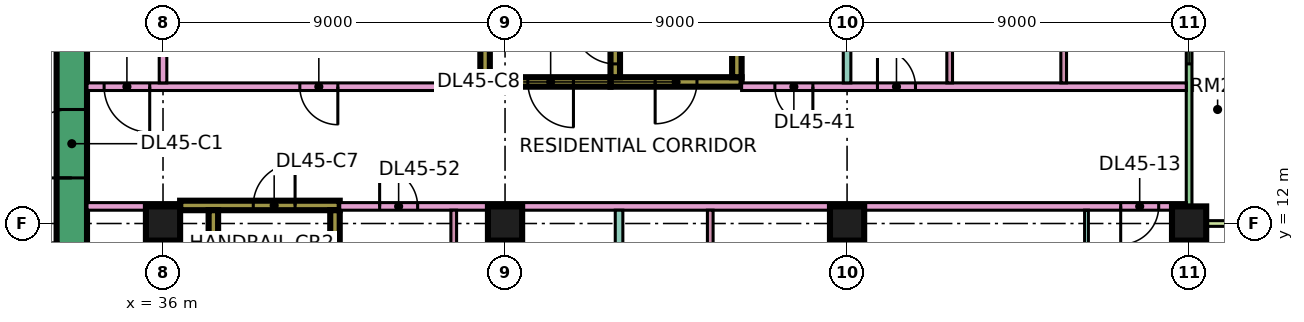
"""IFC4 building model, lengths in metres.
Left out: names, types, materials, properties, quantities, classifications, styles, units other than length and angle.
Written with IfcOpenShell. Run it as: python <this file> out.ifc"""

import sys

from ifc_helpers import new_model, si_unit, direction, frame, frame_2d, origin, origin_2d, place, context, subcontext, project, spatial, rectangle, extrude, element, fill, save


model = new_model("IFC4")
c1 = context("Model", 3, precision=1e-05, world=origin(), true_north=direction((0.0, 1.0)))
c2 = subcontext(c1, "Body", "Model", "MODEL_VIEW")
j1 = project(units=[si_unit("LENGTHUNIT", "METRE"), si_unit("PLANEANGLEUNIT", "RADIAN")], contexts=[c1])
p1 = place(None, origin())
s1 = spatial("IfcSite", under=j1, at=p1, CompositionType="ELEMENT")
p2 = place(p1, origin())
s2 = spatial("IfcBuilding", under=s1, at=p2, CompositionType="ELEMENT")
p3 = place(p2, frame((0.0, 0.0, 194.9)))
s3 = spatial("IfcBuildingStorey", under=s2, at=p3, CompositionType="ELEMENT", Elevation=194.9)
for number, where, z_axis, x_axis in (
    (1, (36.0, 12.0, 0.0), (0.0, 0.0, 1.0), (1.0, 0.0, 0.0)),
    (2, (45.0, 12.0, 0.0), (0.0, 0.0, 1.0), (1.0, 0.0, 0.0)),
    (3, (54.0, 12.0, 0.0), (0.0, 0.0, 1.0), (1.0, 0.0, 0.0)),
    (4, (63.0, 12.0, 0.0), (0.0, 0.0, 1.0), (1.0, 0.0, 0.0)),
):
    element("IfcColumn", number, at=place(p3, frame(where, z_axis=z_axis, x_axis=x_axis)), inside=s3, PredefinedType="COLUMN", context=c2, shape_type="SweptSolid", body=[
        extrude(rectangle(XDim=0.9, YDim=0.9, at=origin_2d()), origin(), (0.0, 0.0, 1.0), 3.75),
    ])
p4 = place(p3, frame((33.6, 7.8, 0.0), z_axis=(0.0, 0.0, 1.0), x_axis=(0.0, 1.0, 0.0)))
e5 = element("IfcWall", 5, at=p4, inside=s3, PredefinedType="SHEAR", context=c2, shape_type="SweptSolid", body=[
    extrude(rectangle(XDim=11.4, YDim=0.8, at=frame_2d((5.7, 0.0))), origin(), (0.0, 0.0, 1.0), 3.75),
])
p5 = place(p4, frame((5.4, 0.0, 0.0)))
e6 = element("IfcOpeningElement", 6, at=p5, cuts=e5, PredefinedType="OPENING", context=c2, shape_type="SweptSolid", body=[
    extrude(rectangle(XDim=1.8, YDim=2.4, at=frame_2d((0.9, 1.2))), frame((0.0, 0.41, 0.0), z_axis=(0.0, -1.0, 0.0), x_axis=(1.0, 0.0, 0.0)), (0.0, 0.0, 1.0), 0.82),
])
p6 = place(p3, frame((36.45, 12.475, 0.0), z_axis=(0.0, 0.0, 1.0), x_axis=(1.0, 0.0, 0.0)))
e7 = element("IfcWall", 7, at=p6, inside=s3, PredefinedType="SHEAR", context=c2, shape_type="SweptSolid", body=[
    extrude(rectangle(XDim=4.2, YDim=0.25, at=frame_2d((2.1, 0.0))), origin(), (0.0, 0.0, 1.0), 3.75),
])
p7 = place(p6, frame((1.925, 0.0, 0.0)))
e8 = element("IfcOpeningElement", 8, at=p7, cuts=e7, PredefinedType="OPENING", context=c2, shape_type="SweptSolid", body=[
    extrude(rectangle(XDim=1.1, YDim=2.2, at=frame_2d((0.55, 1.1))), frame((0.0, 0.135, 0.0), z_axis=(0.0, -1.0, 0.0), x_axis=(1.0, 0.0, 0.0)), (0.0, 0.0, 1.0), 0.27),
])
for number, where, z_axis, x_axis in (
    (9, (37.325, 5.85, 0.0), (0.0, 0.0, 1.0), (0.0, 1.0, 0.0)),
    (10, (40.525, 5.85, 0.0), (0.0, 0.0, 1.0), (0.0, 1.0, 0.0)),
):
    element("IfcWall", number, at=place(p3, frame(where, z_axis=z_axis, x_axis=x_axis)), inside=s3, PredefinedType="SHEAR", context=c2, shape_type="SweptSolid", body=[
        extrude(rectangle(XDim=6.5, YDim=0.25, at=frame_2d((3.25, 0.0))), origin(), (0.0, 0.0, 1.0), 3.75),
    ])
p8 = place(p3, frame((47.775, 15.725, 0.0), z_axis=(0.0, 0.0, 1.0), x_axis=(1.0, 0.0, 0.0)))
e11 = element("IfcWall", 11, at=p8, inside=s3, PredefinedType="SHEAR", context=c2, shape_type="SweptSolid", body=[
    extrude(rectangle(XDim=3.45, YDim=0.25, at=frame_2d((1.725, 0.0))), origin(), (0.0, 0.0, 1.0), 3.75),
])
p9 = place(p8, frame((1.175, 0.0, 0.0)))
e12 = element("IfcOpeningElement", 12, at=p9, cuts=e11, PredefinedType="OPENING", context=c2, shape_type="SweptSolid", body=[
    extrude(rectangle(XDim=1.1, YDim=2.2, at=frame_2d((0.55, 1.1))), frame((0.0, 0.135, 0.0), z_axis=(0.0, -1.0, 0.0), x_axis=(1.0, 0.0, 0.0)), (0.0, 0.0, 1.0), 0.27),
])
p10 = place(p3, frame((47.9, 15.85, 0.0), z_axis=(0.0, 0.0, 1.0), x_axis=(0.0, 1.0, 0.0)))
e13 = element("IfcWall", 13, at=p10, inside=s3, PredefinedType="SHEAR", context=c2, shape_type="SweptSolid", body=[
    extrude(rectangle(XDim=6.5, YDim=0.25, at=frame_2d((3.25, 0.0))), origin(), (0.0, 0.0, 1.0), 3.75),
])
p11 = place(p10, frame((0.35, 0.0, 0.0)))
e14 = element("IfcOpeningElement", 14, at=p11, cuts=e13, PredefinedType="OPENING", context=c2, shape_type="SweptSolid", body=[
    extrude(rectangle(XDim=1.1, YDim=2.2, at=frame_2d((0.55, 1.1))), frame((0.0, 0.135, 0.0), z_axis=(0.0, -1.0, 0.0), x_axis=(1.0, 0.0, 0.0)), (0.0, 0.0, 1.0), 0.27),
])
p12 = place(p3, frame((51.1, 15.85, 0.0), z_axis=(0.0, 0.0, 1.0), x_axis=(0.0, 1.0, 0.0)))
e15 = element("IfcWall", 15, at=p12, inside=s3, PredefinedType="SHEAR", context=c2, shape_type="SweptSolid", body=[
    extrude(rectangle(XDim=6.5, YDim=0.25, at=frame_2d((3.25, 0.0))), origin(), (0.0, 0.0, 1.0), 3.75),
])
p13 = place(p3, frame((44.35, 15.725, 0.0), z_axis=(0.0, 0.0, 1.0), x_axis=(1.0, 0.0, 0.0)))
e16 = element("IfcWall", 16, at=p13, inside=s3, PredefinedType="SHEAR", context=c2, shape_type="SweptSolid", body=[
    extrude(rectangle(XDim=3.425, YDim=0.25, at=frame_2d((1.712, 0.0))), origin(), (0.0, 0.0, 1.0), 3.75),
])
p14 = place(p13, frame((1.25, 0.0, 0.0)))
e17 = element("IfcOpeningElement", 17, at=p14, cuts=e16, PredefinedType="OPENING", context=c2, shape_type="SweptSolid", body=[
    extrude(rectangle(XDim=1.2, YDim=2.2, at=frame_2d((0.6, 1.1))), frame((0.0, 0.135, 0.0), z_axis=(0.0, -1.0, 0.0), x_axis=(1.0, 0.0, 0.0)), (0.0, 0.0, 1.0), 0.27),
])
p15 = place(p3, frame((44.475, 15.85, 0.0), z_axis=(0.0, 0.0, 1.0), x_axis=(0.0, 1.0, 0.0)))
e18 = element("IfcWall", 18, at=p15, inside=s3, PredefinedType="SHEAR", context=c2, shape_type="SweptSolid", body=[
    extrude(rectangle(XDim=6.5, YDim=0.25, at=frame_2d((3.25, 0.0))), origin(), (0.0, 0.0, 1.0), 3.75),
])
p16 = place(p15, frame((1.75, 0.0, 0.0)))
e19 = element("IfcOpeningElement", 19, at=p16, cuts=e18, PredefinedType="OPENING", context=c2, shape_type="SweptSolid", body=[
    extrude(rectangle(XDim=1.1, YDim=2.2, at=frame_2d((0.55, 1.1))), frame((0.0, 0.135, 0.0), z_axis=(0.0, -1.0, 0.0), x_axis=(1.0, 0.0, 0.0)), (0.0, 0.0, 1.0), 0.27),
])
p17 = place(p15, frame((4.3, 0.0, 0.0)))
e20 = element("IfcOpeningElement", 20, at=p17, cuts=e18, PredefinedType="OPENING", context=c2, shape_type="SweptSolid", body=[
    extrude(rectangle(XDim=1.1, YDim=2.2, at=frame_2d((0.55, 1.1))), frame((0.0, 0.135, 0.0), z_axis=(0.0, -1.0, 0.0), x_axis=(1.0, 0.0, 0.0)), (0.0, 0.0, 1.0), 0.27),
])
p18 = place(p3, frame((63.0, 12.075, 0.0), z_axis=(0.0, 0.0, 1.0), x_axis=(0.0, 1.0, 0.0)))
e21 = element("IfcWall", 21, at=p18, inside=s3, PredefinedType="SOLIDWALL", context=c2, shape_type="SweptSolid", body=[
    extrude(rectangle(XDim=10.35, YDim=0.15, at=frame_2d((5.175, 0.0))), origin(), (0.0, 0.0, 1.0), 3.35),
])
p19 = place(p18, frame((4.125, 0.0, 0.45)))
e22 = element("IfcOpeningElement", 22, at=p19, cuts=e21, PredefinedType="OPENING", context=c2, shape_type="SweptSolid", body=[
    extrude(rectangle(XDim=1.8, YDim=2.4, at=frame_2d((0.9, 1.2))), frame((0.0, 0.085, 0.0), z_axis=(0.0, -1.0, 0.0), x_axis=(1.0, 0.0, 0.0)), (0.0, 0.0, 1.0), 0.17),
])
p20 = place(p18, frame((8.137, 0.0, 0.45)))
e23 = element("IfcOpeningElement", 23, at=p20, cuts=e21, PredefinedType="OPENING", context=c2, shape_type="SweptSolid", body=[
    extrude(rectangle(XDim=1.8, YDim=2.4, at=frame_2d((0.9, 1.2))), frame((0.0, 0.085, 0.0), z_axis=(0.0, -1.0, 0.0), x_axis=(1.0, 0.0, 0.0)), (0.0, 0.0, 1.0), 0.17),
])
p21 = place(p3, frame((64.5, 12.0, 0.0), z_axis=(0.0, 0.0, 1.0), x_axis=(-1.0, 0.0, 0.0)))
e24 = element("IfcWall", 24, at=p21, inside=s3, PredefinedType="SOLIDWALL", context=c2, shape_type="SweptSolid", body=[
    extrude(rectangle(XDim=1.5, YDim=0.15, at=frame_2d((0.75, 0.0))), origin(), (0.0, 0.0, 1.0), 3.35),
])
p22 = place(p3, frame((34.0, 12.45, 0.0), z_axis=(0.0, 0.0, 1.0), x_axis=(1.0, 0.0, 0.0)))
e25 = element("IfcWall", 25, at=p22, inside=s3, PredefinedType="PARTITIONING", context=c2, shape_type="SweptSolid", body=[
    extrude(rectangle(XDim=2.451, YDim=0.2, at=frame_2d((1.226, 0.0))), origin(), (0.0, 0.0, 1.0), 3.35),
])
p23 = place(p3, frame((34.0, 15.6, 0.0), z_axis=(0.0, 0.0, 1.0), x_axis=(1.0, 0.0, 0.0)))
e26 = element("IfcWall", 26, at=p23, inside=s3, PredefinedType="PARTITIONING", context=c2, shape_type="SweptSolid", body=[
    extrude(rectangle(XDim=10.35, YDim=0.2, at=frame_2d((5.175, 0.0))), origin(), (0.0, 0.0, 1.0), 3.35),
])
p24 = place(p23, frame((5.6, 0.0, 0.0)))
e27 = element("IfcOpeningElement", 27, at=p24, cuts=e26, PredefinedType="OPENING", context=c2, shape_type="SweptSolid", body=[
    extrude(rectangle(XDim=1.0, YDim=2.1, at=frame_2d((0.5, 1.05))), frame((0.0, 0.11, 0.0), z_axis=(0.0, -1.0, 0.0), x_axis=(1.0, 0.0, 0.0)), (0.0, 0.0, 1.0), 0.22),
])
p25 = place(p23, frame((0.45, 0.0, 0.0)))
e28 = element("IfcOpeningElement", 28, at=p25, cuts=e26, PredefinedType="OPENING", context=c2, shape_type="SweptSolid", body=[
    extrude(rectangle(XDim=1.2, YDim=2.1, at=frame_2d((0.6, 1.05))), frame((0.0, 0.11, 0.0), z_axis=(0.0, -1.0, 0.0), x_axis=(1.0, 0.0, 0.0)), (0.0, 0.0, 1.0), 0.22),
])
p26 = place(p3, frame((36.0, 15.7, 0.0), z_axis=(0.0, 0.0, 1.0), x_axis=(0.0, 1.0, 0.0)))
e29 = element("IfcWall", 29, at=p26, inside=s3, PredefinedType="PARTITIONING", context=c2, shape_type="SweptSolid", body=[
    extrude(rectangle(XDim=8.3, YDim=0.2, at=frame_2d((4.15, 0.0))), origin(), (0.0, 0.0, 1.0), 3.35),
])
p27 = place(p3, frame((40.65, 12.45, 0.0), z_axis=(0.0, 0.0, 1.0), x_axis=(1.0, 0.0, 0.0)))
e30 = element("IfcWall", 30, at=p27, inside=s3, PredefinedType="PARTITIONING", context=c2, shape_type="SweptSolid", body=[
    extrude(rectangle(XDim=22.276, YDim=0.2, at=frame_2d((11.138, 0.0))), origin(), (0.0, 0.0, 1.0), 3.35),
])
p28 = place(p27, frame((20.55, 0.0, 0.0)))
e31 = element("IfcOpeningElement", 31, at=p28, cuts=e30, PredefinedType="OPENING", context=c2, shape_type="SweptSolid", body=[
    extrude(rectangle(XDim=1.0, YDim=2.1, at=frame_2d((0.5, 1.05))), frame((0.0, 0.11, 0.0), z_axis=(0.0, -1.0, 0.0), x_axis=(1.0, 0.0, 0.0)), (0.0, 0.0, 1.0), 0.22),
])
p29 = place(p27, frame((1.05, 0.0, 0.0)))
e32 = element("IfcOpeningElement", 32, at=p29, cuts=e30, PredefinedType="OPENING", context=c2, shape_type="SweptSolid", body=[
    extrude(rectangle(XDim=1.0, YDim=2.1, at=frame_2d((0.5, 1.05))), frame((0.0, 0.11, 0.0), z_axis=(0.0, -1.0, 0.0), x_axis=(1.0, 0.0, 0.0)), (0.0, 0.0, 1.0), 0.22),
])
p30 = place(p3, frame((43.65, 5.825, 0.0), z_axis=(0.0, 0.0, 1.0), x_axis=(0.0, 1.0, 0.0)))
e33 = element("IfcWall", 33, at=p30, inside=s3, PredefinedType="PARTITIONING", context=c2, shape_type="SweptSolid", body=[
    extrude(rectangle(XDim=6.525, YDim=0.15, at=frame_2d((3.263, 0.0))), origin(), (0.0, 0.0, 1.0), 3.35),
])
p31 = place(p30, frame((4.425, 0.0, 0.0)))
e34 = element("IfcOpeningElement", 34, at=p31, cuts=e33, PredefinedType="OPENING", context=c2, shape_type="SweptSolid", body=[
    extrude(rectangle(XDim=0.9, YDim=2.1, at=frame_2d((0.45, 1.05))), frame((0.0, 0.085, 0.0), z_axis=(0.0, -1.0, 0.0), x_axis=(1.0, 0.0, 0.0)), (0.0, 0.0, 1.0), 0.17),
])
p32 = place(p3, frame((48.0, 0.0, 0.0), z_axis=(0.0, 0.0, 1.0), x_axis=(0.0, 1.0, 0.0)))
e35 = element("IfcWall", 35, at=p32, inside=s3, PredefinedType="PARTITIONING", context=c2, shape_type="SweptSolid", body=[
    extrude(rectangle(XDim=12.35, YDim=0.2, at=frame_2d((6.175, 0.0))), origin(), (0.0, 0.0, 1.0), 3.35),
])
p33 = place(p3, frame((50.4, 7.725, 0.0), z_axis=(0.0, 0.0, 1.0), x_axis=(0.0, 1.0, 0.0)))
e36 = element("IfcWall", 36, at=p33, inside=s3, PredefinedType="PARTITIONING", context=c2, shape_type="SweptSolid", body=[
    extrude(rectangle(XDim=4.625, YDim=0.15, at=frame_2d((2.312, 0.0))), origin(), (0.0, 0.0, 1.0), 3.35),
])
p34 = place(p3, frame((51.225, 15.6, 0.0), z_axis=(0.0, 0.0, 1.0), x_axis=(1.0, 0.0, 0.0)))
e37 = element("IfcWall", 37, at=p34, inside=s3, PredefinedType="PARTITIONING", context=c2, shape_type="SweptSolid", body=[
    extrude(rectangle(XDim=11.701, YDim=0.2, at=frame_2d((5.851, 0.0))), origin(), (0.0, 0.0, 1.0), 3.35),
])
p35 = place(p34, frame((3.575, 0.0, 0.0)))
e38 = element("IfcOpeningElement", 38, at=p35, cuts=e37, PredefinedType="OPENING", context=c2, shape_type="SweptSolid", body=[
    extrude(rectangle(XDim=1.0, YDim=2.1, at=frame_2d((0.5, 1.05))), frame((0.0, 0.11, 0.0), z_axis=(0.0, -1.0, 0.0), x_axis=(1.0, 0.0, 0.0)), (0.0, 0.0, 1.0), 0.22),
])
p36 = place(p34, frame((0.875, 0.0, 0.0)))
e39 = element("IfcOpeningElement", 39, at=p36, cuts=e37, PredefinedType="OPENING", context=c2, shape_type="SweptSolid", body=[
    extrude(rectangle(XDim=1.0, YDim=2.1, at=frame_2d((0.5, 1.05))), frame((0.0, 0.11, 0.0), z_axis=(0.0, -1.0, 0.0), x_axis=(1.0, 0.0, 0.0)), (0.0, 0.0, 1.0), 0.22),
])
p37 = place(p3, frame((54.0, 7.725, 0.0), z_axis=(0.0, 0.0, 1.0), x_axis=(0.0, 1.0, 0.0)))
e40 = element("IfcWall", 40, at=p37, inside=s3, PredefinedType="PARTITIONING", context=c2, shape_type="SweptSolid", body=[
    extrude(rectangle(XDim=4.625, YDim=0.15, at=frame_2d((2.312, 0.0))), origin(), (0.0, 0.0, 1.0), 3.35),
])
p38 = place(p3, frame((54.0, 15.7, 0.0), z_axis=(0.0, 0.0, 1.0), x_axis=(0.0, 1.0, 0.0)))
e41 = element("IfcWall", 41, at=p38, inside=s3, PredefinedType="PARTITIONING", context=c2, shape_type="SweptSolid", body=[
    extrude(rectangle(XDim=8.3, YDim=0.2, at=frame_2d((4.15, 0.0))), origin(), (0.0, 0.0, 1.0), 3.35),
])
for number, where, z_axis, x_axis in (
    (42, (56.7, 15.7, 0.0), (0.0, 0.0, 1.0), (0.0, 1.0, 0.0)),
    (43, (59.7, 15.7, 0.0), (0.0, 0.0, 1.0), (0.0, 1.0, 0.0)),
):
    element("IfcWall", number, at=place(p3, frame(where, z_axis=z_axis, x_axis=x_axis)), inside=s3, PredefinedType="PARTITIONING", context=c2, shape_type="SweptSolid", body=[
        extrude(rectangle(XDim=2.825, YDim=0.15, at=frame_2d((1.413, 0.0))), origin(), (0.0, 0.0, 1.0), 3.35),
    ])
p39 = place(p3, frame((60.3, 7.725, 0.0), z_axis=(0.0, 0.0, 1.0), x_axis=(0.0, 1.0, 0.0)))
e44 = element("IfcWall", 44, at=p39, inside=s3, PredefinedType="PARTITIONING", context=c2, shape_type="SweptSolid", body=[
    extrude(rectangle(XDim=4.625, YDim=0.1, at=frame_2d((2.312, 0.0))), origin(), (0.0, 0.0, 1.0), 3.35),
])
p40 = place(p39, frame((1.875, 0.0, 0.0)))
e45 = element("IfcOpeningElement", 45, at=p40, cuts=e44, PredefinedType="OPENING", context=c2, shape_type="SweptSolid", body=[
    extrude(rectangle(XDim=0.9, YDim=2.1, at=frame_2d((0.45, 1.05))), frame((0.0, 0.06, 0.0), z_axis=(0.0, -1.0, 0.0), x_axis=(1.0, 0.0, 0.0)), (0.0, 0.0, 1.0), 0.12),
])
p41 = place(p19, origin())
e46 = element("IfcWindow", 46, at=p41, inside=s3, PartitioningType="SINGLE_PANEL", PredefinedType="WINDOW", context=c2, shape_type="SweptSolid", body=[
    extrude(rectangle(XDim=1.8, YDim=2.4, at=frame_2d((0.9, 1.2))), frame((0.0, 0.03, 0.0), z_axis=(0.0, -1.0, 0.0), x_axis=(1.0, 0.0, 0.0)), (0.0, 0.0, 1.0), 0.06),
])
fill(e22, e46)
p42 = place(p5, origin())
e47 = element("IfcDoor", 47, at=p42, inside=s3, OperationType="DOUBLE_DOOR_SINGLE_SWING", PredefinedType="DOOR", context=c2, shape_type="SweptSolid", body=[
    extrude(rectangle(XDim=1.8, YDim=2.4, at=frame_2d((0.9, 1.2))), frame((0.0, 0.025, 0.0), z_axis=(0.0, -1.0, 0.0), x_axis=(1.0, 0.0, 0.0)), (0.0, 0.0, 1.0), 0.05),
])
fill(e6, e47)
p43 = place(p7, frame((1.1, 0.0, 0.0), z_axis=(0.0, 0.0, 1.0), x_axis=(-1.0, 0.0, 0.0)))
e48 = element("IfcDoor", 48, at=p43, inside=s3, OperationType="SINGLE_SWING_RIGHT", PredefinedType="DOOR", context=c2, shape_type="SweptSolid", body=[
    extrude(rectangle(XDim=1.1, YDim=2.2, at=frame_2d((0.55, 1.1))), frame((0.0, 0.025, 0.0), z_axis=(0.0, -1.0, 0.0), x_axis=(1.0, 0.0, 0.0)), (0.0, 0.0, 1.0), 0.05),
])
fill(e8, e48)
p44 = place(p9, frame((1.1, 0.0, 0.0), z_axis=(0.0, 0.0, 1.0), x_axis=(-1.0, 0.0, 0.0)))
e49 = element("IfcDoor", 49, at=p44, inside=s3, OperationType="SINGLE_SWING_LEFT", PredefinedType="DOOR", context=c2, shape_type="SweptSolid", body=[
    extrude(rectangle(XDim=1.1, YDim=2.2, at=frame_2d((0.55, 1.1))), frame((0.0, 0.025, 0.0), z_axis=(0.0, -1.0, 0.0), x_axis=(1.0, 0.0, 0.0)), (0.0, 0.0, 1.0), 0.05),
])
fill(e12, e49)
p45 = place(p14, origin())
e50 = element("IfcDoor", 50, at=p45, inside=s3, OperationType="SINGLE_SWING_RIGHT", PredefinedType="DOOR", context=c2, shape_type="SweptSolid", body=[
    extrude(rectangle(XDim=1.2, YDim=2.2, at=frame_2d((0.6, 1.1))), frame((0.0, 0.025, 0.0), z_axis=(0.0, -1.0, 0.0), x_axis=(1.0, 0.0, 0.0)), (0.0, 0.0, 1.0), 0.05),
])
fill(e17, e50)
p46 = place(p11, frame((1.1, 0.0, 0.0), z_axis=(0.0, 0.0, 1.0), x_axis=(-1.0, 0.0, 0.0)))
e51 = element("IfcDoor", 51, at=p46, inside=s3, OperationType="SINGLE_SWING_RIGHT", PredefinedType="DOOR", context=c2, shape_type="SweptSolid", body=[
    extrude(rectangle(XDim=1.1, YDim=2.2, at=frame_2d((0.55, 1.1))), frame((0.0, 0.025, 0.0), z_axis=(0.0, -1.0, 0.0), x_axis=(1.0, 0.0, 0.0)), (0.0, 0.0, 1.0), 0.05),
])
fill(e14, e51)
p47 = place(p24, origin())
e52 = element("IfcDoor", 52, at=p47, inside=s3, OperationType="SINGLE_SWING_RIGHT", PredefinedType="DOOR", context=c2, shape_type="SweptSolid", body=[
    extrude(rectangle(XDim=1.0, YDim=2.1, at=frame_2d((0.5, 1.05))), frame((0.0, 0.025, 0.0), z_axis=(0.0, -1.0, 0.0), x_axis=(1.0, 0.0, 0.0)), (0.0, 0.0, 1.0), 0.05),
])
fill(e27, e52)
p48 = place(p35, origin())
e53 = element("IfcDoor", 53, at=p48, inside=s3, OperationType="SINGLE_SWING_LEFT", PredefinedType="DOOR", context=c2, shape_type="SweptSolid", body=[
    extrude(rectangle(XDim=1.0, YDim=2.1, at=frame_2d((0.5, 1.05))), frame((0.0, 0.025, 0.0), z_axis=(0.0, -1.0, 0.0), x_axis=(1.0, 0.0, 0.0)), (0.0, 0.0, 1.0), 0.05),
])
fill(e38, e53)
p49 = place(p28, frame((1.0, 0.0, 0.0), z_axis=(0.0, 0.0, 1.0), x_axis=(-1.0, 0.0, 0.0)))
e54 = element("IfcDoor", 54, at=p49, inside=s3, OperationType="SINGLE_SWING_LEFT", PredefinedType="DOOR", context=c2, shape_type="SweptSolid", body=[
    extrude(rectangle(XDim=1.0, YDim=2.1, at=frame_2d((0.5, 1.05))), frame((0.0, 0.025, 0.0), z_axis=(0.0, -1.0, 0.0), x_axis=(1.0, 0.0, 0.0)), (0.0, 0.0, 1.0), 0.05),
])
fill(e31, e54)
p50 = place(p25, origin())
e55 = element("IfcDoor", 55, at=p50, inside=s3, OperationType="SINGLE_SWING_RIGHT", PredefinedType="DOOR", context=c2, shape_type="SweptSolid", body=[
    extrude(rectangle(XDim=1.2, YDim=2.1, at=frame_2d((0.6, 1.05))), frame((0.0, 0.025, 0.0), z_axis=(0.0, -1.0, 0.0), x_axis=(1.0, 0.0, 0.0)), (0.0, 0.0, 1.0), 0.05),
])
fill(e28, e55)
p51 = place(p36, origin())
e56 = element("IfcDoor", 56, at=p51, inside=s3, OperationType="SINGLE_SWING_RIGHT", PredefinedType="DOOR", context=c2, shape_type="SweptSolid", body=[
    extrude(rectangle(XDim=1.0, YDim=2.1, at=frame_2d((0.5, 1.05))), frame((0.0, 0.025, 0.0), z_axis=(0.0, -1.0, 0.0), x_axis=(1.0, 0.0, 0.0)), (0.0, 0.0, 1.0), 0.05),
])
fill(e39, e56)
p52 = place(p29, origin())
e57 = element("IfcDoor", 57, at=p52, inside=s3, OperationType="SINGLE_SWING_LEFT", PredefinedType="DOOR", context=c2, shape_type="SweptSolid", body=[
    extrude(rectangle(XDim=1.0, YDim=2.1, at=frame_2d((0.5, 1.05))), frame((0.0, 0.025, 0.0), z_axis=(0.0, -1.0, 0.0), x_axis=(1.0, 0.0, 0.0)), (0.0, 0.0, 1.0), 0.05),
])
fill(e32, e57)
save(model, sys.argv[1])
